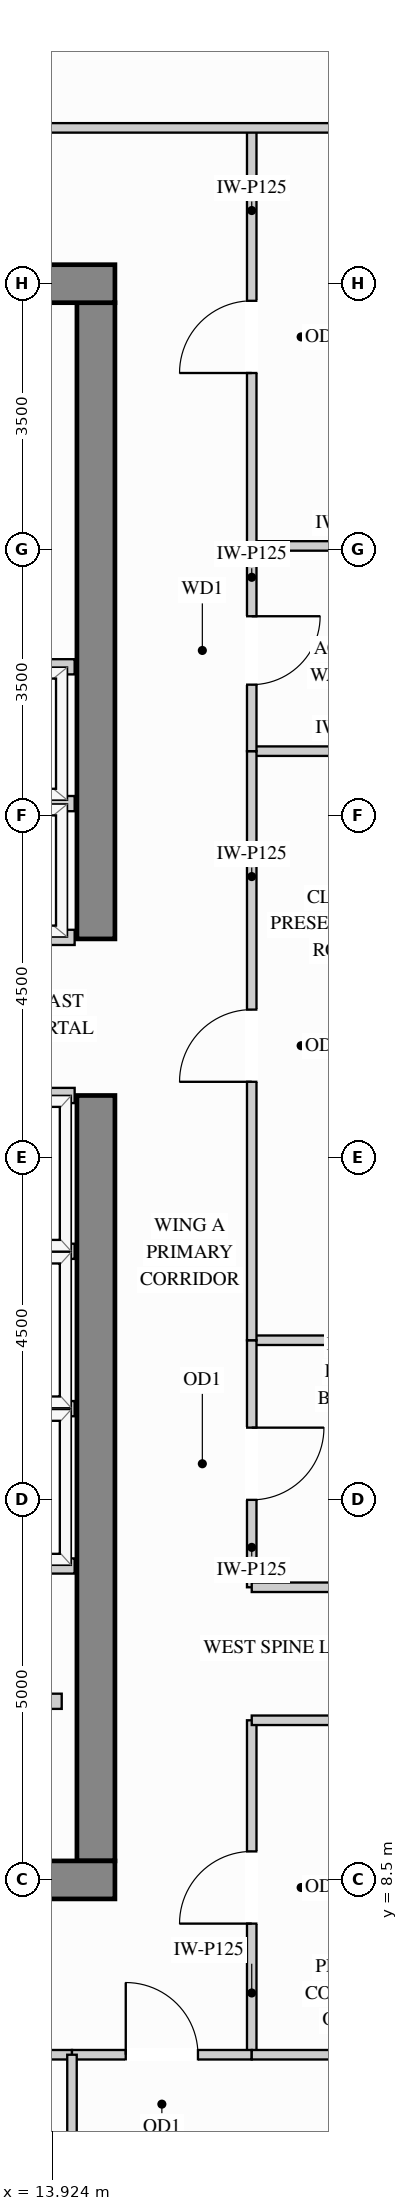
"""IFC4 building model, lengths in metres.
Left out: names, types, materials, properties, quantities, classifications, styles, units other than length and angle.
Written with IfcOpenShell. Run it as: python <this file> out.ifc"""

import sys

from ifc_helpers import new_model, si_unit, direction, frame, frame_2d, origin, place, context, subcontext, project, spatial, rectangle, extrude, source, transform, mapped, element, fill, save


model = new_model("IFC4")
c1 = context("Model", 3, precision=1e-05, world=origin(), true_north=direction((0.0, 1.0)))
c2 = subcontext(c1, "Body", "Model", "MODEL_VIEW")
j1 = project(units=[si_unit("LENGTHUNIT", "METRE"), si_unit("PLANEANGLEUNIT", "RADIAN")], contexts=[c1])
p1 = place(None, origin())
s1 = spatial("IfcSite", under=j1, at=p1, CompositionType="ELEMENT")
p2 = place(p1, origin())
s2 = spatial("IfcBuilding", under=s1, at=p2, CompositionType="ELEMENT")
p3 = place(p2, frame((0.0, 0.0, 219.6)))
s3 = spatial("IfcBuildingStorey", under=s2, at=p3, CompositionType="ELEMENT", Elevation=219.6)
m1 = source(origin(), c2, "Body", "SweptSolid", [
    extrude(rectangle(XDim=10.07, YDim=0.5, at=frame_2d((5.035, 0.0))), origin(), (0.0, 0.0, 1.0), 3.4),
])
p4 = place(p3, frame((14.5, 8.75, 0.0), z_axis=(0.0, 0.0, 1.0), x_axis=(0.0, 1.0, 0.0)))
e1 = element("IfcWall", 1, at=p4, inside=s3, PredefinedType="SHEAR", context=c2, shape_type="MappedRepresentation", body=[
    mapped(m1, transform((0.0, 0.0, 0.0), x_axis=(1.0, 0.0, 0.0), y_axis=(0.0, 1.0, 0.0), z_axis=(0.0, 0.0, 1.0))),
])
m2 = source(origin(), c2, "Body", "SweptSolid", [
    extrude(rectangle(XDim=8.37, YDim=0.5, at=frame_2d((4.185, 0.0))), origin(), (0.0, 0.0, 1.0), 3.4),
])
p5 = place(p3, frame((14.5, 20.88, 0.0), z_axis=(0.0, 0.0, 1.0), x_axis=(0.0, 1.0, 0.0)))
e2 = element("IfcWall", 2, at=p5, inside=s3, PredefinedType="SHEAR", context=c2, shape_type="MappedRepresentation", body=[
    mapped(m2, transform((0.0, 0.0, 0.0), x_axis=(1.0, 0.0, 0.0), y_axis=(0.0, 1.0, 0.0), z_axis=(0.0, 0.0, 1.0))),
])
m3 = source(origin(), c2, "Body", "SweptSolid", [
    extrude(rectangle(XDim=10.5, YDim=0.5, at=frame_2d((5.25, 0.0))), origin(), (0.0, 0.0, 1.0), 3.4),
])
for number, where, z_axis, x_axis in (
    (3, (4.25, 29.5, 0.0), (0.0, 0.0, 1.0), (1.0, 0.0, 0.0)),
    (4, (4.25, 8.5, 0.0), (0.0, 0.0, 1.0), (1.0, 0.0, 0.0)),
):
    element("IfcWall", number, at=place(p3, frame(where, z_axis=z_axis, x_axis=x_axis)), inside=s3, PredefinedType="SHEAR", context=c2, shape_type="MappedRepresentation", body=[
        mapped(m3, transform((0.0, 0.0, 0.0), x_axis=(1.0, 0.0, 0.0), y_axis=(0.0, 1.0, 0.0), z_axis=(0.0, 0.0, 1.0))),
    ])
m4 = source(origin(), c2, "Body", "SweptSolid", [
    extrude(rectangle(XDim=2.6, YDim=0.125, at=frame_2d((1.3, 0.0))), origin(), (0.0, 0.0, 1.0), 3.385),
])
p6 = place(p3, frame((16.55, 15.6, 0.0), z_axis=(0.0, 0.0, 1.0), x_axis=(1.0, 0.0, 0.0)))
e5 = element("IfcWall", 5, at=p6, inside=s3, PredefinedType="PARTITIONING", context=c2, shape_type="MappedRepresentation", body=[
    mapped(m4, transform((0.0, 0.0, 0.0), x_axis=(1.0, 0.0, 0.0), y_axis=(0.0, 1.0, 0.0), z_axis=(0.0, 0.0, 1.0))),
])
m5 = source(origin(), c2, "Body", "SweptSolid", [
    extrude(rectangle(XDim=2.598, YDim=0.125, at=frame_2d((1.299, 0.0))), origin(), (0.0, 0.0, 1.0), 3.385),
])
for number, where, z_axis, x_axis in (
    (6, (16.55, 23.35, 0.0), (0.0, 0.0, 1.0), (1.0, 0.0, 0.0)),
    (7, (16.55, 26.05, 0.0), (0.0, 0.0, 1.0), (1.0, 0.0, 0.0)),
):
    element("IfcWall", number, at=place(p3, frame(where, z_axis=z_axis, x_axis=x_axis)), inside=s3, PredefinedType="PARTITIONING", context=c2, shape_type="MappedRepresentation", body=[
        mapped(m5, transform((0.0, 0.0, 0.0), x_axis=(1.0, 0.0, 0.0), y_axis=(0.0, 1.0, 0.0), z_axis=(0.0, 0.0, 1.0))),
    ])
p7 = place(p3, frame((16.55, 12.35, 0.0), z_axis=(0.0, 0.0, 1.0), x_axis=(0.0, 1.0, 0.0)))
e8 = element("IfcWall", 8, at=p7, inside=s3, PredefinedType="PARTITIONING", context=c2, shape_type="SweptSolid", body=[
    extrude(rectangle(XDim=3.25, YDim=0.125, at=frame_2d((1.625, 0.0))), origin(), (0.0, 0.0, 1.0), 3.385),
])
p8 = place(p7, frame((1.15, 0.0, 0.0)))
e9 = element("IfcOpeningElement", 9, at=p8, cuts=e8, PredefinedType="OPENING", context=c2, shape_type="SweptSolid", body=[
    extrude(rectangle(XDim=0.95, YDim=2.15, at=frame_2d((0.475, 1.075))), frame((0.0, 0.073, 0.0), z_axis=(0.0, -1.0, 0.0), x_axis=(1.0, 0.0, 0.0)), (0.0, 0.0, 1.0), 0.145),
])
p9 = place(p3, frame((16.55, 15.6, 0.0), z_axis=(0.0, 0.0, 1.0), x_axis=(0.0, 1.0, 0.0)))
e10 = element("IfcWall", 10, at=p9, inside=s3, PredefinedType="PARTITIONING", context=c2, shape_type="SweptSolid", body=[
    extrude(rectangle(XDim=7.75, YDim=0.125, at=frame_2d((3.875, 0.0))), origin(), (0.0, 0.0, 1.0), 3.385),
])
p10 = place(p9, frame((3.4, 0.0, 0.0)))
e11 = element("IfcOpeningElement", 11, at=p10, cuts=e10, PredefinedType="OPENING", context=c2, shape_type="SweptSolid", body=[
    extrude(rectangle(XDim=0.95, YDim=2.15, at=frame_2d((0.475, 1.075))), frame((0.0, 0.073, 0.0), z_axis=(0.0, -1.0, 0.0), x_axis=(1.0, 0.0, 0.0)), (0.0, 0.0, 1.0), 0.145),
])
p11 = place(p3, frame((16.55, 26.05, 0.0), z_axis=(0.0, 0.0, 1.0), x_axis=(0.0, 1.0, 0.0)))
e12 = element("IfcWall", 12, at=p11, inside=s3, PredefinedType="PARTITIONING", context=c2, shape_type="SweptSolid", body=[
    extrude(rectangle(XDim=5.5, YDim=0.125, at=frame_2d((2.75, 0.0))), origin(), (0.0, 0.0, 1.0), 3.385),
])
p12 = place(p11, frame((2.275, 0.0, 0.0)))
e13 = element("IfcOpeningElement", 13, at=p12, cuts=e12, PredefinedType="OPENING", context=c2, shape_type="SweptSolid", body=[
    extrude(rectangle(XDim=0.95, YDim=2.15, at=frame_2d((0.475, 1.075))), frame((0.0, 0.073, 0.0), z_axis=(0.0, -1.0, 0.0), x_axis=(1.0, 0.0, 0.0)), (0.0, 0.0, 1.0), 0.145),
])
p13 = place(p3, frame((16.55, 6.2, 0.0), z_axis=(0.0, 0.0, 1.0), x_axis=(0.0, 1.0, 0.0)))
e14 = element("IfcWall", 14, at=p13, inside=s3, PredefinedType="PARTITIONING", context=c2, shape_type="SweptSolid", body=[
    extrude(rectangle(XDim=4.4, YDim=0.125, at=frame_2d((2.2, 0.0))), origin(), (0.0, 0.0, 1.0), 3.385),
])
p14 = place(p13, frame((1.725, 0.0, 0.0)))
e15 = element("IfcOpeningElement", 15, at=p14, cuts=e14, PredefinedType="OPENING", context=c2, shape_type="SweptSolid", body=[
    extrude(rectangle(XDim=0.95, YDim=2.15, at=frame_2d((0.475, 1.075))), frame((0.0, 0.073, 0.0), z_axis=(0.0, -1.0, 0.0), x_axis=(1.0, 0.0, 0.0)), (0.0, 0.0, 1.0), 0.145),
])
p15 = place(p3, frame((16.55, 23.35, 0.0), z_axis=(0.0, 0.0, 1.0), x_axis=(0.0, 1.0, 0.0)))
e16 = element("IfcWall", 16, at=p15, inside=s3, PredefinedType="PARTITIONING", context=c2, shape_type="SweptSolid", body=[
    extrude(rectangle(XDim=2.7, YDim=0.125, at=frame_2d((1.35, 0.0))), origin(), (0.0, 0.0, 1.0), 3.385),
])
p16 = place(p15, frame((0.875, 0.0, 0.0)))
e17 = element("IfcOpeningElement", 17, at=p16, cuts=e16, PredefinedType="OPENING", context=c2, shape_type="SweptSolid", body=[
    extrude(rectangle(XDim=0.9, YDim=2.15, at=frame_2d((0.45, 1.075))), frame((0.0, 0.073, 0.0), z_axis=(0.0, -1.0, 0.0), x_axis=(1.0, 0.0, 0.0)), (0.0, 0.0, 1.0), 0.145),
])
m6 = source(origin(), c2, "Body", "SweptSolid", [
    extrude(rectangle(XDim=12.598, YDim=0.125, at=frame_2d((6.299, 0.0))), origin(), (0.0, 0.0, 1.0), 3.385),
])
p17 = place(p3, frame((6.55, 31.55, 0.0), z_axis=(0.0, 0.0, 1.0), x_axis=(1.0, 0.0, 0.0)))
e18 = element("IfcWall", 18, at=p17, inside=s3, PredefinedType="PARTITIONING", context=c2, shape_type="MappedRepresentation", body=[
    mapped(m6, transform((0.0, 0.0, 0.0), x_axis=(1.0, 0.0, 0.0), y_axis=(0.0, 1.0, 0.0), z_axis=(0.0, 0.0, 1.0))),
])
m7 = source(origin(), c2, "Body", "SweptSolid", [
    extrude(rectangle(XDim=2.95, YDim=0.125, at=frame_2d((1.475, 0.0))), origin(), (0.0, 0.0, 1.0), 3.385),
])
for number, where, z_axis, x_axis in (
    (19, (16.55, 12.35, 0.0), (0.0, 0.0, 1.0), (1.0, 0.0, 0.0)),
    (20, (16.55, 10.6, 0.0), (0.0, 0.0, 1.0), (1.0, 0.0, 0.0)),
):
    element("IfcWall", number, at=place(p3, frame(where, z_axis=z_axis, x_axis=x_axis)), inside=s3, PredefinedType="PARTITIONING", context=c2, shape_type="MappedRepresentation", body=[
        mapped(m7, transform((0.0, 0.0, 0.0), x_axis=(1.0, 0.0, 0.0), y_axis=(0.0, 1.0, 0.0), z_axis=(0.0, 0.0, 1.0))),
    ])
p18 = place(p3, frame((10.544, 6.2, 0.0), z_axis=(0.0, 0.0, 1.0), x_axis=(1.0, 0.0, 0.0)))
e21 = element("IfcWall", 21, at=p18, inside=s3, PredefinedType="PARTITIONING", context=c2, shape_type="SweptSolid", body=[
    extrude(rectangle(XDim=3.641, YDim=0.125, at=frame_2d((1.821, 0.0))), origin(), (0.0, 0.0, 1.0), 2.848),
])
p19 = place(p18, frame((1.345, 0.0, 0.0)))
e22 = element("IfcOpeningElement", 22, at=p19, cuts=e21, PredefinedType="OPENING", context=c2, shape_type="SweptSolid", body=[
    extrude(rectangle(XDim=0.95, YDim=2.15, at=frame_2d((0.475, 1.075))), frame((0.0, 0.073, 0.0), z_axis=(0.0, -1.0, 0.0), x_axis=(1.0, 0.0, 0.0)), (0.0, 0.0, 1.0), 0.145),
])
p20 = place(p3, frame((14.185, 6.2, 0.0), z_axis=(0.0, 0.0, 1.0), x_axis=(1.0, 0.0, 0.0)))
e23 = element("IfcWall", 23, at=p20, inside=s3, PredefinedType="PARTITIONING", context=c2, shape_type="SweptSolid", body=[
    extrude(rectangle(XDim=2.365, YDim=0.125, at=frame_2d((1.183, 0.0))), origin(), (0.0, 0.0, 1.0), 2.848),
])
p21 = place(p20, frame((0.708, 0.0, 0.0)))
e24 = element("IfcOpeningElement", 24, at=p21, cuts=e23, PredefinedType="OPENING", context=c2, shape_type="SweptSolid", body=[
    extrude(rectangle(XDim=0.95, YDim=2.15, at=frame_2d((0.475, 1.075))), frame((0.0, 0.073, 0.0), z_axis=(0.0, -1.0, 0.0), x_axis=(1.0, 0.0, 0.0)), (0.0, 0.0, 1.0), 0.145),
])
m8 = source(origin(), c2, "Body", "SweptSolid", [
    extrude(rectangle(XDim=2.6, YDim=0.125, at=frame_2d((1.3, 0.0))), origin(), (0.0, 0.0, 1.0), 2.848),
])
p22 = place(p3, frame((16.55, 6.2, 0.0), z_axis=(0.0, 0.0, 1.0), x_axis=(1.0, 0.0, 0.0)))
e25 = element("IfcWall", 25, at=p22, inside=s3, PredefinedType="PARTITIONING", context=c2, shape_type="MappedRepresentation", body=[
    mapped(m8, transform((0.0, 0.0, 0.0), x_axis=(1.0, 0.0, 0.0), y_axis=(0.0, 1.0, 0.0), z_axis=(0.0, 0.0, 1.0))),
])
m9 = source(origin(), c2, "Body", "SweptSolid", [
    extrude(rectangle(XDim=5.15, YDim=0.125, at=frame_2d((2.575, 0.0))), origin(), (0.0, 0.0, 1.0), 3.385),
])
p23 = place(p3, frame((14.185, 1.05, 0.0), z_axis=(0.0, 0.0, 1.0), x_axis=(0.0, 1.0, 0.0)))
e26 = element("IfcWall", 26, at=p23, inside=s3, PredefinedType="PARTITIONING", context=c2, shape_type="MappedRepresentation", body=[
    mapped(m9, transform((0.0, 0.0, 0.0), x_axis=(1.0, 0.0, 0.0), y_axis=(0.0, 1.0, 0.0), z_axis=(0.0, 0.0, 1.0))),
])
m10 = source(origin(), c2, "Body", "SweptSolid", [
    extrude(rectangle(XDim=1.63, YDim=0.2, at=frame_2d((0.815, 0.0))), origin(), (0.0, 0.0, 1.0), 3.385),
])
p24 = place(p3, frame((12.42, 10.85, 0.0), z_axis=(0.0, 0.0, 1.0), x_axis=(1.0, 0.0, 0.0)))
e27 = element("IfcWall", 27, at=p24, inside=s3, PredefinedType="PARTITIONING", context=c2, shape_type="MappedRepresentation", body=[
    mapped(m10, transform((0.0, 0.0, 0.0), x_axis=(1.0, 0.0, 0.0), y_axis=(0.0, 1.0, 0.0), z_axis=(0.0, 0.0, 1.0))),
])
m11 = source(origin(), c2, "Body", "SweptSolid", [
    extrude(rectangle(XDim=2.39, YDim=0.2, at=frame_2d((1.195, 0.0))), origin(), (0.0, 0.0, 1.0), 3.385),
])
for number, where, z_axis, x_axis in (
    (28, (11.83, 22.66, 0.0), (0.0, 0.0, 1.0), (1.0, 0.0, 0.0)),
    (29, (11.83, 20.9, 0.0), (0.0, 0.0, 1.0), (1.0, 0.0, 0.0)),
    (30, (11.83, 24.46, 0.0), (0.0, 0.0, 1.0), (1.0, 0.0, 0.0)),
):
    element("IfcWall", number, at=place(p3, frame(where, z_axis=z_axis, x_axis=x_axis)), inside=s3, PredefinedType="PARTITIONING", context=c2, shape_type="MappedRepresentation", body=[
        mapped(m11, transform((0.0, 0.0, 0.0), x_axis=(1.0, 0.0, 0.0), y_axis=(0.0, 1.0, 0.0), z_axis=(0.0, 0.0, 1.0))),
    ])
m12 = source(origin(), c2, "Body", "SweptSolid", [
    extrude(rectangle(XDim=1.99, YDim=0.2, at=frame_2d((0.995, 0.0))), origin(), (0.0, 0.0, 1.0), 3.385),
])
for number, where, z_axis, x_axis in (
    (31, (12.23, 14.7, 0.0), (0.0, 0.0, 1.0), (1.0, 0.0, 0.0)),
    (32, (12.23, 12.63, 0.0), (0.0, 0.0, 1.0), (1.0, 0.0, 0.0)),
    (33, (12.23, 16.77, 0.0), (0.0, 0.0, 1.0), (1.0, 0.0, 0.0)),
    (34, (12.23, 18.82, 0.0), (0.0, 0.0, 1.0), (1.0, 0.0, 0.0)),
):
    element("IfcWall", number, at=place(p3, frame(where, z_axis=z_axis, x_axis=x_axis)), inside=s3, PredefinedType="PARTITIONING", context=c2, shape_type="MappedRepresentation", body=[
        mapped(m12, transform((0.0, 0.0, 0.0), x_axis=(1.0, 0.0, 0.0), y_axis=(0.0, 1.0, 0.0), z_axis=(0.0, 0.0, 1.0))),
    ])
m13 = source(origin(), c2, "Body", "SweptSolid", [
    extrude(rectangle(XDim=0.95, YDim=2.15, at=frame_2d((0.475, 1.075))), frame((0.0, 0.025, 0.0), z_axis=(0.0, -1.0, 0.0), x_axis=(1.0, 0.0, 0.0)), (0.0, 0.0, 1.0), 0.05),
])
p25 = place(p14, origin())
e35 = element("IfcDoor", 35, at=p25, inside=s3, OperationType="SINGLE_SWING_LEFT", PredefinedType="DOOR", context=c2, shape_type="MappedRepresentation", body=[
    mapped(m13, transform((0.0, 0.0, 0.0), x_axis=(1.0, 0.0, 0.0), y_axis=(0.0, 1.0, 0.0), z_axis=(0.0, 0.0, 1.0))),
])
fill(e15, e35)
p26 = place(p8, origin())
e36 = element("IfcDoor", 36, at=p26, inside=s3, OperationType="SINGLE_SWING_RIGHT", PredefinedType="DOOR", context=c2, shape_type="MappedRepresentation", body=[
    mapped(m13, transform((0.0, 0.0, 0.0), x_axis=(1.0, 0.0, 0.0), y_axis=(0.0, 1.0, 0.0), z_axis=(0.0, 0.0, 1.0))),
])
fill(e9, e36)
p27 = place(p10, origin())
e37 = element("IfcDoor", 37, at=p27, inside=s3, OperationType="SINGLE_SWING_LEFT", PredefinedType="DOOR", context=c2, shape_type="MappedRepresentation", body=[
    mapped(m13, transform((0.0, 0.0, 0.0), x_axis=(1.0, 0.0, 0.0), y_axis=(0.0, 1.0, 0.0), z_axis=(0.0, 0.0, 1.0))),
])
fill(e11, e37)
p28 = place(p12, origin())
e38 = element("IfcDoor", 38, at=p28, inside=s3, OperationType="SINGLE_SWING_LEFT", PredefinedType="DOOR", context=c2, shape_type="MappedRepresentation", body=[
    mapped(m13, transform((0.0, 0.0, 0.0), x_axis=(1.0, 0.0, 0.0), y_axis=(0.0, 1.0, 0.0), z_axis=(0.0, 0.0, 1.0))),
])
fill(e13, e38)
p29 = place(p21, origin())
e39 = element("IfcDoor", 39, at=p29, inside=s3, OperationType="SINGLE_SWING_LEFT", PredefinedType="DOOR", context=c2, shape_type="MappedRepresentation", body=[
    mapped(m13, transform((0.0, 0.0, 0.0), x_axis=(1.0, 0.0, 0.0), y_axis=(0.0, 1.0, 0.0), z_axis=(0.0, 0.0, 1.0))),
])
fill(e24, e39)
m14 = source(origin(), c2, "Body", "SweptSolid", [
    extrude(rectangle(XDim=0.9, YDim=2.15, at=frame_2d((0.45, 1.075))), frame((0.0, 0.025, 0.0), z_axis=(0.0, -1.0, 0.0), x_axis=(1.0, 0.0, 0.0)), (0.0, 0.0, 1.0), 0.05),
])
p30 = place(p16, origin())
e40 = element("IfcDoor", 40, at=p30, inside=s3, OperationType="SINGLE_SWING_RIGHT", PredefinedType="DOOR", context=c2, shape_type="MappedRepresentation", body=[
    mapped(m14, transform((0.0, 0.0, 0.0), x_axis=(1.0, 0.0, 0.0), y_axis=(0.0, 1.0, 0.0), z_axis=(0.0, 0.0, 1.0))),
])
fill(e17, e40)
save(model, sys.argv[1])
